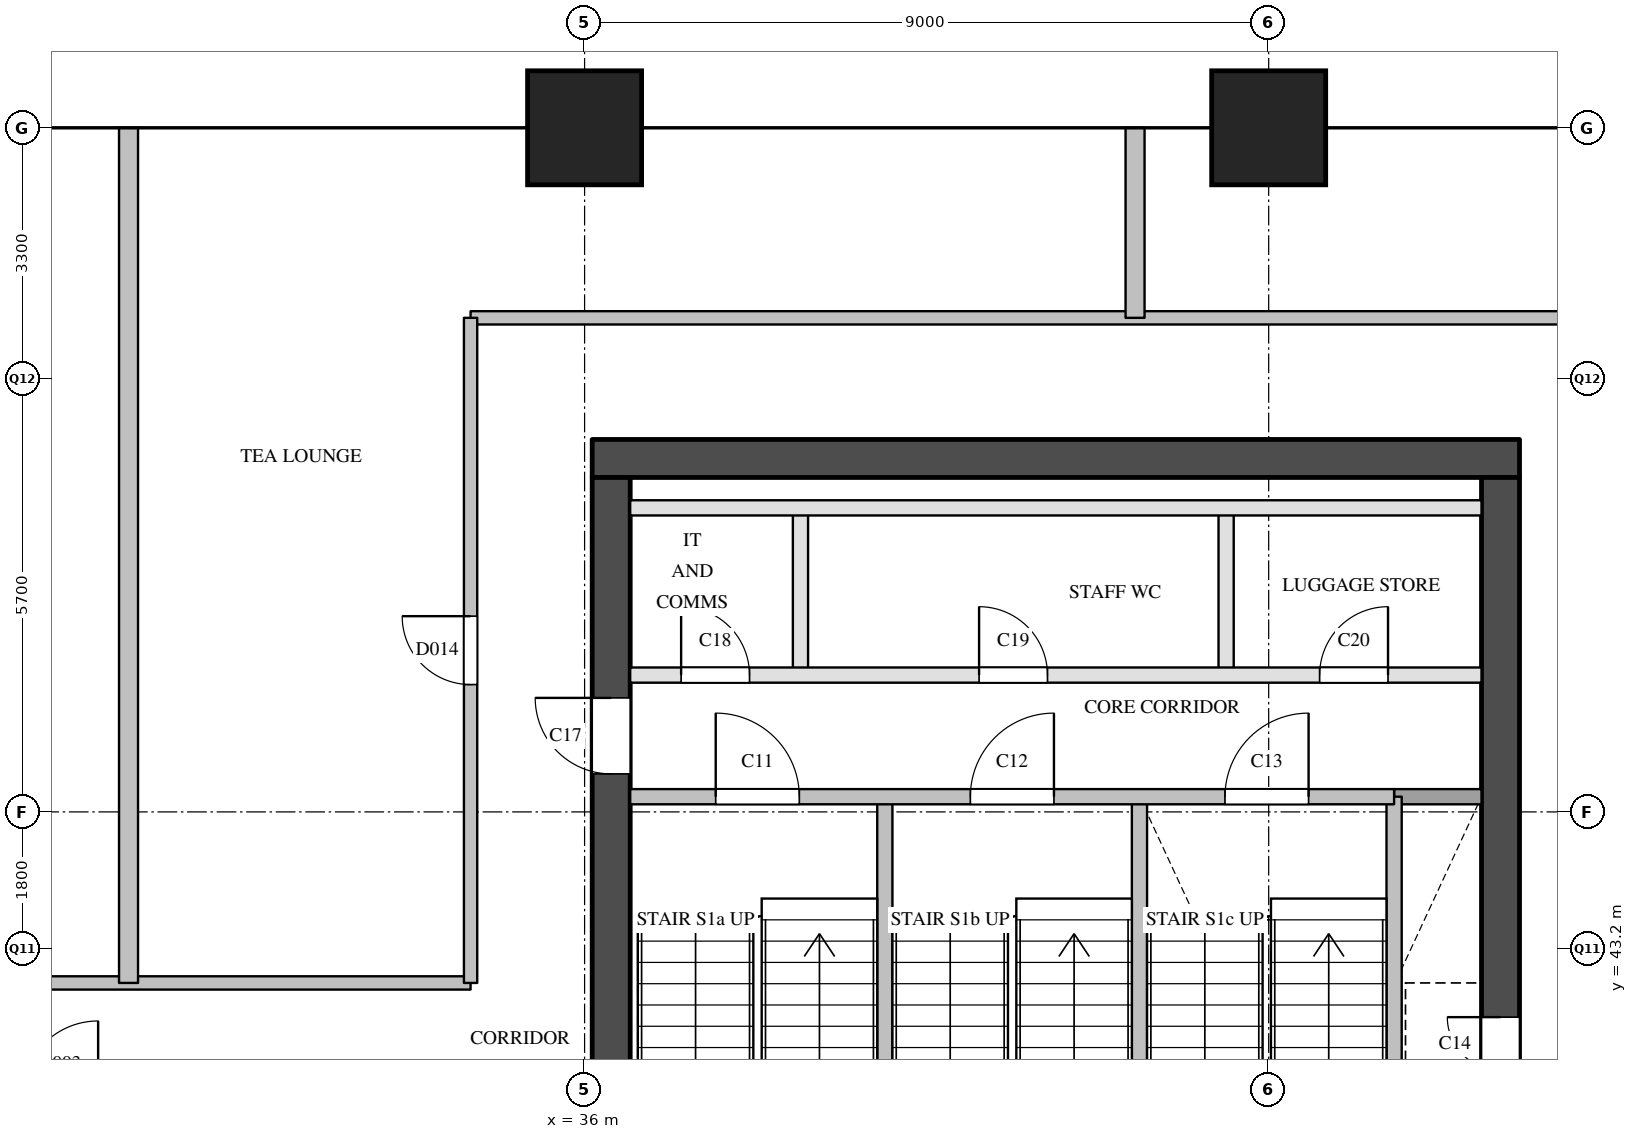
"""IFC4 building model, lengths in metres.
Left out: names, types, materials, properties, quantities, classifications, styles, units other than length and angle.
Written with IfcOpenShell. Run it as: python <this file> out.ifc"""

import sys

from ifc_helpers import new_model, si_unit, direction, frame, frame_2d, origin, origin_2d, place, context, subcontext, project, spatial, rectangle, extrude, element, fill, save


model = new_model("IFC4")
c1 = context("Model", 3, precision=1e-05, world=origin(), true_north=direction((0.0, 1.0)))
c2 = subcontext(c1, "Body", "Model", "MODEL_VIEW")
j1 = project(units=[si_unit("LENGTHUNIT", "METRE"), si_unit("PLANEANGLEUNIT", "RADIAN")], contexts=[c1])
p1 = place(None, origin())
s1 = spatial("IfcSite", under=j1, at=p1, CompositionType="ELEMENT")
p2 = place(p1, origin())
s2 = spatial("IfcBuilding", under=s1, at=p2, CompositionType="ELEMENT")
p3 = place(p2, frame((0.0, 0.0, 158.3)))
s3 = spatial("IfcBuildingStorey", under=s2, at=p3, CompositionType="ELEMENT", Elevation=158.3)
for number, where, z_axis, x_axis in (
    (1, (36.0, 54.0, 0.0), (0.0, 0.0, 1.0), (1.0, 0.0, 0.0)),
    (2, (45.0, 54.0, 0.0), (0.0, 0.0, 1.0), (1.0, 0.0, 0.0)),
):
    element("IfcColumn", number, at=place(p3, frame(where, z_axis=z_axis, x_axis=x_axis)), inside=s3, PredefinedType="COLUMN", context=c2, shape_type="SweptSolid", body=[
        extrude(rectangle(XDim=1.5, YDim=1.5, at=origin_2d()), origin(), (0.0, 0.0, 1.0), 3.9),
    ])
p4 = place(p3, frame((36.1, 49.65, 0.0), z_axis=(0.0, 0.0, 1.0), x_axis=(1.0, 0.0, 0.0)))
e3 = element("IfcWall", 3, at=p4, inside=s3, PredefinedType="SHEAR", context=c2, shape_type="SweptSolid", body=[
    extrude(rectangle(XDim=12.2, YDim=0.5, at=frame_2d((6.1, 0.0))), origin(), (0.0, 0.0, 1.0), 3.6),
])
p5 = place(p3, frame((36.35, 29.1, 0.0), z_axis=(0.0, 0.0, 1.0), x_axis=(0.0, 1.0, 0.0)))
e4 = element("IfcWall", 4, at=p5, inside=s3, PredefinedType="SHEAR", context=c2, shape_type="SweptSolid", body=[
    extrude(rectangle(XDim=20.3, YDim=0.5, at=frame_2d((10.15, 0.0))), origin(), (0.0, 0.0, 1.0), 3.6),
])
p6 = place(p5, frame((3.6, 0.0, 0.0)))
e5 = element("IfcOpeningElement", 5, at=p6, cuts=e4, PredefinedType="OPENING", context=c2, shape_type="SweptSolid", body=[
    extrude(rectangle(XDim=1.8, YDim=2.1, at=frame_2d((0.9, 1.05))), frame((0.0, 0.26, 0.0), z_axis=(0.0, -1.0, 0.0), x_axis=(1.0, 0.0, 0.0)), (0.0, 0.0, 1.0), 0.52),
])
p7 = place(p5, frame((16.4, 0.0, 0.0)))
e6 = element("IfcOpeningElement", 6, at=p7, cuts=e4, PredefinedType="OPENING", context=c2, shape_type="SweptSolid", body=[
    extrude(rectangle(XDim=1.0, YDim=2.1, at=frame_2d((0.5, 1.05))), frame((0.0, 0.26, 0.0), z_axis=(0.0, -1.0, 0.0), x_axis=(1.0, 0.0, 0.0)), (0.0, 0.0, 1.0), 0.52),
])
p8 = place(p3, frame((48.05, 29.1, 0.0), z_axis=(0.0, 0.0, 1.0), x_axis=(0.0, 1.0, 0.0)))
e7 = element("IfcWall", 7, at=p8, inside=s3, PredefinedType="SHEAR", context=c2, shape_type="SweptSolid", body=[
    extrude(rectangle(XDim=20.3, YDim=0.5, at=frame_2d((10.15, 0.0))), origin(), (0.0, 0.0, 1.0), 3.6),
])
p9 = place(p8, frame((12.5, 0.0, 0.0)))
e8 = element("IfcOpeningElement", 8, at=p9, cuts=e7, PredefinedType="OPENING", context=c2, shape_type="SweptSolid", body=[
    extrude(rectangle(XDim=0.7, YDim=2.1, at=frame_2d((0.35, 1.05))), frame((0.0, 0.26, 0.0), z_axis=(0.0, -1.0, 0.0), x_axis=(1.0, 0.0, 0.0)), (0.0, 0.0, 1.0), 0.52),
])
p10 = place(p8, frame((3.9, 0.0, 0.0)))
e9 = element("IfcOpeningElement", 9, at=p10, cuts=e7, PredefinedType="OPENING", context=c2, shape_type="SweptSolid", body=[
    extrude(rectangle(XDim=1.8, YDim=2.1, at=frame_2d((0.9, 1.05))), frame((0.0, 0.26, 0.0), z_axis=(0.0, -1.0, 0.0), x_axis=(1.0, 0.0, 0.0)), (0.0, 0.0, 1.0), 0.52),
])
p11 = place(p3, frame((38.84, 46.8, 0.0), z_axis=(0.0, 0.0, 1.0), x_axis=(0.0, 1.0, 0.0)))
e10 = element("IfcWall", 10, at=p11, inside=s3, PredefinedType="PARTITIONING", context=c2, shape_type="SweptSolid", body=[
    extrude(rectangle(XDim=2.2, YDim=0.2, at=frame_2d((1.1, 0.0))), origin(), (0.0, 0.0, 1.0), 3.6),
])
for number, where, z_axis, x_axis in (
    (11, (39.95, 40.78, 0.0), (0.0, 0.0, 1.0), (0.0, 1.0, 0.0)),
    (12, (43.3, 40.78, 0.0), (0.0, 0.0, 1.0), (0.0, 1.0, 0.0)),
):
    element("IfcWall", number, at=place(p3, frame(where, z_axis=z_axis, x_axis=x_axis)), inside=s3, PredefinedType="SOLIDWALL", context=c2, shape_type="SweptSolid", body=[
        extrude(rectangle(XDim=4.42, YDim=0.2, at=frame_2d((2.21, 0.0))), origin(), (0.0, 0.0, 1.0), 3.6),
    ])
p12 = place(p3, frame((44.44, 46.8, 0.0), z_axis=(0.0, 0.0, 1.0), x_axis=(0.0, 1.0, 0.0)))
e13 = element("IfcWall", 13, at=p12, inside=s3, PredefinedType="PARTITIONING", context=c2, shape_type="SweptSolid", body=[
    extrude(rectangle(XDim=2.2, YDim=0.2, at=frame_2d((1.1, 0.0))), origin(), (0.0, 0.0, 1.0), 3.6),
])
p13 = place(p3, frame((46.65, 40.78, 0.0), z_axis=(0.0, 0.0, 1.0), x_axis=(0.0, 1.0, 0.0)))
e14 = element("IfcWall", 14, at=p13, inside=s3, PredefinedType="SOLIDWALL", context=c2, shape_type="SweptSolid", body=[
    extrude(rectangle(XDim=4.42, YDim=0.2, at=frame_2d((2.21, 0.0))), origin(), (0.0, 0.0, 1.0), 3.6),
])
p14 = place(p3, frame((46.65, 45.2, 0.0), z_axis=(0.0, 0.0, 1.0), x_axis=(1.0, 0.0, 0.0)))
e15 = element("IfcWall", 15, at=p14, inside=s3, PredefinedType="SOLIDWALL", context=c2, shape_type="SweptSolid", body=[
    extrude(rectangle(XDim=1.15, YDim=0.2, at=frame_2d((0.575, 0.0))), origin(), (0.0, 0.0, 1.0), 3.6),
])
p15 = place(p3, frame((36.6, 45.2, 0.0), z_axis=(0.0, 0.0, 1.0), x_axis=(1.0, 0.0, 0.0)))
e16 = element("IfcWall", 16, at=p15, inside=s3, PredefinedType="SOLIDWALL", context=c2, shape_type="SweptSolid", body=[
    extrude(rectangle(XDim=10.05, YDim=0.2, at=frame_2d((5.025, 0.0))), origin(), (0.0, 0.0, 1.0), 3.6),
])
p16 = place(p15, frame((1.125, 0.0, 0.0)))
e17 = element("IfcOpeningElement", 17, at=p16, cuts=e16, PredefinedType="OPENING", context=c2, shape_type="SweptSolid", body=[
    extrude(rectangle(XDim=1.1, YDim=2.1, at=frame_2d((0.55, 1.05))), frame((0.0, 0.11, 0.0), z_axis=(0.0, -1.0, 0.0), x_axis=(1.0, 0.0, 0.0)), (0.0, 0.0, 1.0), 0.22),
])
p17 = place(p15, frame((4.475, 0.0, 0.0)))
e18 = element("IfcOpeningElement", 18, at=p17, cuts=e16, PredefinedType="OPENING", context=c2, shape_type="SweptSolid", body=[
    extrude(rectangle(XDim=1.1, YDim=2.1, at=frame_2d((0.55, 1.05))), frame((0.0, 0.11, 0.0), z_axis=(0.0, -1.0, 0.0), x_axis=(1.0, 0.0, 0.0)), (0.0, 0.0, 1.0), 0.22),
])
p18 = place(p15, frame((7.825, 0.0, 0.0)))
e19 = element("IfcOpeningElement", 19, at=p18, cuts=e16, PredefinedType="OPENING", context=c2, shape_type="SweptSolid", body=[
    extrude(rectangle(XDim=1.1, YDim=2.1, at=frame_2d((0.55, 1.05))), frame((0.0, 0.11, 0.0), z_axis=(0.0, -1.0, 0.0), x_axis=(1.0, 0.0, 0.0)), (0.0, 0.0, 1.0), 0.22),
])
p19 = place(p3, frame((36.6, 46.8, 0.0), z_axis=(0.0, 0.0, 1.0), x_axis=(1.0, 0.0, 0.0)))
e20 = element("IfcWall", 20, at=p19, inside=s3, PredefinedType="PARTITIONING", context=c2, shape_type="SweptSolid", body=[
    extrude(rectangle(XDim=11.2, YDim=0.2, at=frame_2d((5.6, 0.0))), origin(), (0.0, 0.0, 1.0), 3.6),
])
p20 = place(p19, frame((0.67, 0.0, 0.0)))
e21 = element("IfcOpeningElement", 21, at=p20, cuts=e20, PredefinedType="OPENING", context=c2, shape_type="SweptSolid", body=[
    extrude(rectangle(XDim=0.9, YDim=2.1, at=frame_2d((0.45, 1.05))), frame((0.0, 0.11, 0.0), z_axis=(0.0, -1.0, 0.0), x_axis=(1.0, 0.0, 0.0)), (0.0, 0.0, 1.0), 0.22),
])
p21 = place(p19, frame((4.59, 0.0, 0.0)))
e22 = element("IfcOpeningElement", 22, at=p21, cuts=e20, PredefinedType="OPENING", context=c2, shape_type="SweptSolid", body=[
    extrude(rectangle(XDim=0.9, YDim=2.1, at=frame_2d((0.45, 1.05))), frame((0.0, 0.11, 0.0), z_axis=(0.0, -1.0, 0.0), x_axis=(1.0, 0.0, 0.0)), (0.0, 0.0, 1.0), 0.22),
])
p22 = place(p19, frame((9.07, 0.0, 0.0)))
e23 = element("IfcOpeningElement", 23, at=p22, cuts=e20, PredefinedType="OPENING", context=c2, shape_type="SweptSolid", body=[
    extrude(rectangle(XDim=0.9, YDim=2.1, at=frame_2d((0.45, 1.05))), frame((0.0, 0.11, 0.0), z_axis=(0.0, -1.0, 0.0), x_axis=(1.0, 0.0, 0.0)), (0.0, 0.0, 1.0), 0.22),
])
p23 = place(p3, frame((36.6, 49.0, 0.0), z_axis=(0.0, 0.0, 1.0), x_axis=(1.0, 0.0, 0.0)))
e24 = element("IfcWall", 24, at=p23, inside=s3, PredefinedType="PARTITIONING", context=c2, shape_type="SweptSolid", body=[
    extrude(rectangle(XDim=11.2, YDim=0.2, at=frame_2d((5.6, 0.0))), origin(), (0.0, 0.0, 1.0), 3.6),
])
p24 = place(p3, frame((19.5, 42.75, 0.0), z_axis=(0.0, 0.0, 1.0), x_axis=(1.0, 0.0, 0.0)))
e25 = element("IfcWall", 25, at=p24, inside=s3, PredefinedType="PARTITIONING", context=c2, shape_type="SweptSolid", body=[
    extrude(rectangle(XDim=15.0, YDim=0.175, at=frame_2d((7.5, 0.0))), origin(), (0.0, 0.0, 1.0), 2.6),
])
p25 = place(p24, frame((4.8, 0.0, 0.0)))
e26 = element("IfcOpeningElement", 26, at=p25, cuts=e25, PredefinedType="OPENING", context=c2, shape_type="SweptSolid", body=[
    extrude(rectangle(XDim=0.9, YDim=2.1, at=frame_2d((0.45, 1.05))), frame((0.0, 0.097, 0.0), z_axis=(0.0, -1.0, 0.0), x_axis=(1.0, 0.0, 0.0)), (0.0, 0.0, 1.0), 0.195),
])
p26 = place(p3, frame((34.5, 51.5, 0.0), z_axis=(0.0, 0.0, 1.0), x_axis=(1.0, 0.0, 0.0)))
e27 = element("IfcWall", 27, at=p26, inside=s3, PredefinedType="PARTITIONING", context=c2, shape_type="SweptSolid", body=[
    extrude(rectangle(XDim=15.4, YDim=0.175, at=frame_2d((7.7, 0.0))), origin(), (0.0, 0.0, 1.0), 3.6),
])
p27 = place(p3, frame((34.5, 42.75, 0.0), z_axis=(0.0, 0.0, 1.0), x_axis=(0.0, 1.0, 0.0)))
e28 = element("IfcWall", 28, at=p27, inside=s3, PredefinedType="PARTITIONING", context=c2, shape_type="SweptSolid", body=[
    extrude(rectangle(XDim=8.75, YDim=0.175, at=frame_2d((4.375, 0.0))), origin(), (0.0, 0.0, 1.0), 3.6),
])
p28 = place(p27, frame((3.925, 0.0, 0.0)))
e29 = element("IfcOpeningElement", 29, at=p28, cuts=e28, PredefinedType="OPENING", context=c2, shape_type="SweptSolid", body=[
    extrude(rectangle(XDim=0.9, YDim=2.1, at=frame_2d((0.45, 1.05))), frame((0.0, 0.097, 0.0), z_axis=(0.0, -1.0, 0.0), x_axis=(1.0, 0.0, 0.0)), (0.0, 0.0, 1.0), 0.195),
])
p29 = place(p3, frame((30.0, 42.75, 0.0), z_axis=(0.0, 0.0, 1.0), x_axis=(0.0, 1.0, 0.0)))
e30 = element("IfcWall", 30, at=p29, inside=s3, PredefinedType="PARTITIONING", context=c2, shape_type="SweptSolid", body=[
    extrude(rectangle(XDim=11.25, YDim=0.25, at=frame_2d((5.625, 0.0))), origin(), (0.0, 0.0, 1.0), 2.6),
])
p30 = place(p3, frame((43.242, 51.5, 0.0), z_axis=(0.0, 0.0, 1.0), x_axis=(0.0, 1.0, 0.0)))
e31 = element("IfcWall", 31, at=p30, inside=s3, PredefinedType="PARTITIONING", context=c2, shape_type="SweptSolid", body=[
    extrude(rectangle(XDim=2.5, YDim=0.25, at=frame_2d((1.25, 0.0))), origin(), (0.0, 0.0, 1.0), 2.6),
])
p31 = place(p16, origin())
e32 = element("IfcDoor", 32, at=p31, inside=s3, OperationType="SINGLE_SWING_LEFT", PredefinedType="DOOR", context=c2, shape_type="SweptSolid", body=[
    extrude(rectangle(XDim=1.1, YDim=2.1, at=frame_2d((0.55, 1.05))), frame((0.0, 0.025, 0.0), z_axis=(0.0, -1.0, 0.0), x_axis=(1.0, 0.0, 0.0)), (0.0, 0.0, 1.0), 0.05),
])
fill(e17, e32)
p32 = place(p17, origin())
e33 = element("IfcDoor", 33, at=p32, inside=s3, OperationType="SINGLE_SWING_RIGHT", PredefinedType="DOOR", context=c2, shape_type="SweptSolid", body=[
    extrude(rectangle(XDim=1.1, YDim=2.1, at=frame_2d((0.55, 1.05))), frame((0.0, 0.025, 0.0), z_axis=(0.0, -1.0, 0.0), x_axis=(1.0, 0.0, 0.0)), (0.0, 0.0, 1.0), 0.05),
])
fill(e18, e33)
p33 = place(p18, origin())
e34 = element("IfcDoor", 34, at=p33, inside=s3, OperationType="SINGLE_SWING_RIGHT", PredefinedType="DOOR", context=c2, shape_type="SweptSolid", body=[
    extrude(rectangle(XDim=1.1, YDim=2.1, at=frame_2d((0.55, 1.05))), frame((0.0, 0.025, 0.0), z_axis=(0.0, -1.0, 0.0), x_axis=(1.0, 0.0, 0.0)), (0.0, 0.0, 1.0), 0.05),
])
fill(e19, e34)
p34 = place(p9, origin())
e35 = element("IfcDoor", 35, at=p34, inside=s3, OperationType="SINGLE_SWING_RIGHT", PredefinedType="DOOR", context=c2, shape_type="SweptSolid", body=[
    extrude(rectangle(XDim=0.7, YDim=2.1, at=frame_2d((0.35, 1.05))), frame((0.0, 0.025, 0.0), z_axis=(0.0, -1.0, 0.0), x_axis=(1.0, 0.0, 0.0)), (0.0, 0.0, 1.0), 0.05),
])
fill(e8, e35)
p35 = place(p7, origin())
e36 = element("IfcDoor", 36, at=p35, inside=s3, OperationType="SINGLE_SWING_RIGHT", PredefinedType="DOOR", context=c2, shape_type="SweptSolid", body=[
    extrude(rectangle(XDim=1.0, YDim=2.1, at=frame_2d((0.5, 1.05))), frame((0.0, 0.025, 0.0), z_axis=(0.0, -1.0, 0.0), x_axis=(1.0, 0.0, 0.0)), (0.0, 0.0, 1.0), 0.05),
])
fill(e6, e36)
p36 = place(p20, origin())
e37 = element("IfcDoor", 37, at=p36, inside=s3, OperationType="SINGLE_SWING_LEFT", PredefinedType="DOOR", context=c2, shape_type="SweptSolid", body=[
    extrude(rectangle(XDim=0.9, YDim=2.1, at=frame_2d((0.45, 1.05))), frame((0.0, 0.025, 0.0), z_axis=(0.0, -1.0, 0.0), x_axis=(1.0, 0.0, 0.0)), (0.0, 0.0, 1.0), 0.05),
])
fill(e21, e37)
p37 = place(p21, origin())
e38 = element("IfcDoor", 38, at=p37, inside=s3, OperationType="SINGLE_SWING_LEFT", PredefinedType="DOOR", context=c2, shape_type="SweptSolid", body=[
    extrude(rectangle(XDim=0.9, YDim=2.1, at=frame_2d((0.45, 1.05))), frame((0.0, 0.025, 0.0), z_axis=(0.0, -1.0, 0.0), x_axis=(1.0, 0.0, 0.0)), (0.0, 0.0, 1.0), 0.05),
])
fill(e22, e38)
p38 = place(p22, origin())
e39 = element("IfcDoor", 39, at=p38, inside=s3, OperationType="SINGLE_SWING_RIGHT", PredefinedType="DOOR", context=c2, shape_type="SweptSolid", body=[
    extrude(rectangle(XDim=0.9, YDim=2.1, at=frame_2d((0.45, 1.05))), frame((0.0, 0.025, 0.0), z_axis=(0.0, -1.0, 0.0), x_axis=(1.0, 0.0, 0.0)), (0.0, 0.0, 1.0), 0.05),
])
fill(e23, e39)
p39 = place(p28, origin())
e40 = element("IfcDoor", 40, at=p39, inside=s3, OperationType="SINGLE_SWING_RIGHT", PredefinedType="DOOR", context=c2, shape_type="SweptSolid", body=[
    extrude(rectangle(XDim=0.9, YDim=2.1, at=frame_2d((0.45, 1.05))), frame((0.0, 0.025, 0.0), z_axis=(0.0, -1.0, 0.0), x_axis=(1.0, 0.0, 0.0)), (0.0, 0.0, 1.0), 0.05),
])
fill(e29, e40)
save(model, sys.argv[1])
